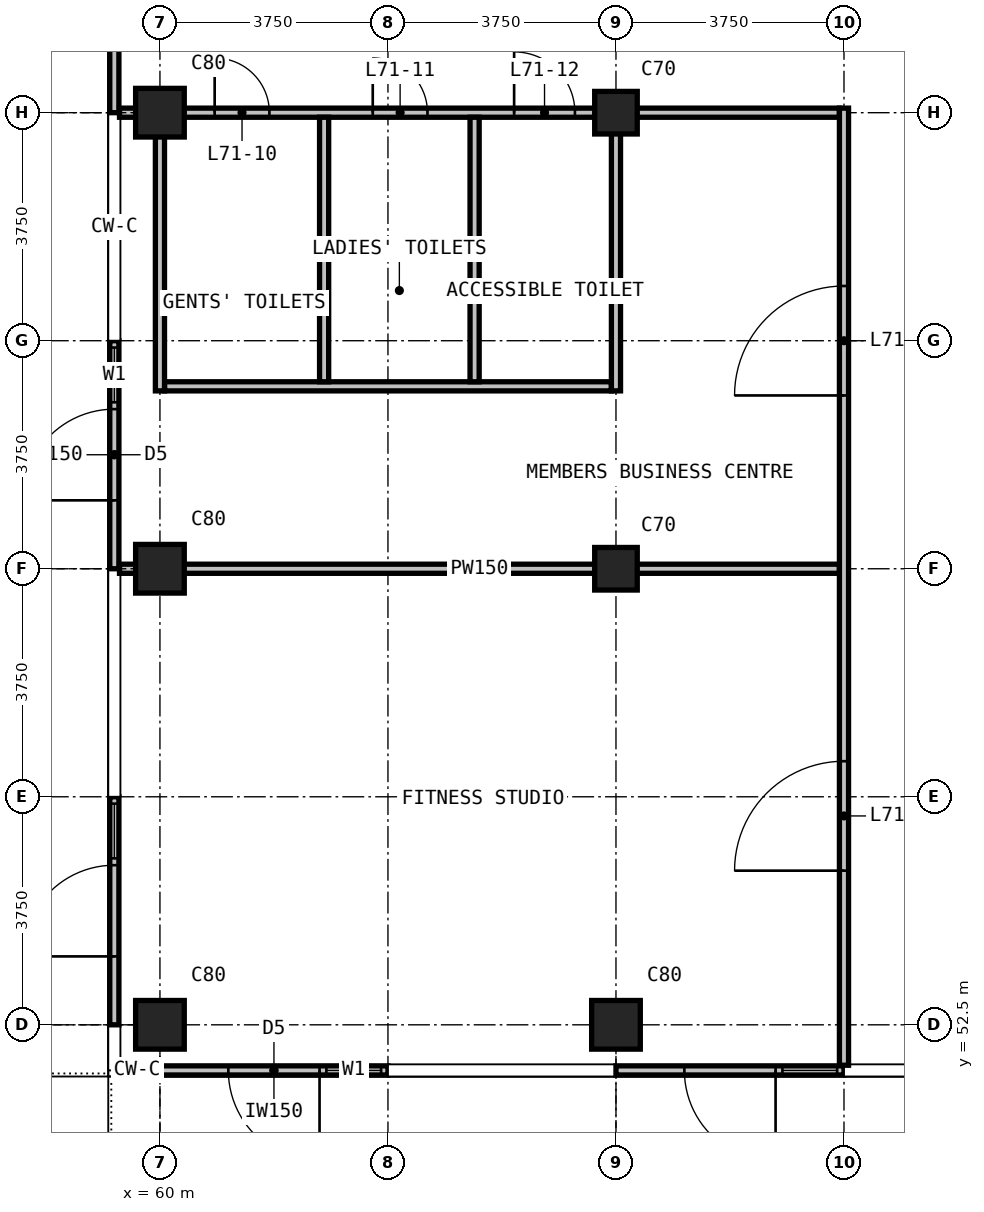
"""IFC4 building model, lengths in metres.
Left out: names, types, materials, properties, quantities, classifications, styles, units other than length and angle.
Written with IfcOpenShell. Run it as: python <this file> out.ifc"""

import sys

from ifc_helpers import new_model, si_unit, direction, frame, frame_2d, origin, origin_2d, place, context, subcontext, project, spatial, rectangle, extrude, element, fill, save


model = new_model("IFC4")
c1 = context("Model", 3, precision=1e-05, world=origin(), true_north=direction((0.0, 1.0)))
c2 = subcontext(c1, "Body", "Model", "MODEL_VIEW")
j1 = project(units=[si_unit("LENGTHUNIT", "METRE"), si_unit("PLANEANGLEUNIT", "RADIAN")], contexts=[c1])
p1 = place(None, origin())
s1 = spatial("IfcSite", under=j1, at=p1, CompositionType="ELEMENT")
p2 = place(p1, origin())
s2 = spatial("IfcBuilding", under=s1, at=p2, CompositionType="ELEMENT")
p3 = place(p2, frame((0.0, 0.0, 272.9)))
s3 = spatial("IfcBuildingStorey", under=s2, at=p3, CompositionType="ELEMENT", Elevation=272.9)
for number, where, z_axis, x_axis in (
    (1, (60.0, 52.5, 0.0), (0.0, 0.0, 1.0), (1.0, 0.0, 0.0)),
    (2, (60.0, 60.0, 0.0), (0.0, 0.0, 1.0), (1.0, 0.0, 0.0)),
    (3, (60.0, 67.5, 0.0), (0.0, 0.0, 1.0), (1.0, 0.0, 0.0)),
    (4, (67.5, 52.5, 0.0), (0.0, 0.0, 1.0), (1.0, 0.0, 0.0)),
):
    element("IfcColumn", number, at=place(p3, frame(where, z_axis=z_axis, x_axis=x_axis)), inside=s3, PredefinedType="COLUMN", context=c2, shape_type="SweptSolid", body=[
        extrude(rectangle(XDim=0.8, YDim=0.8, at=origin_2d()), origin(), (0.0, 0.0, 1.0), 3.6),
    ])
for number, where, z_axis, x_axis in (
    (5, (67.5, 60.0, 0.0), (0.0, 0.0, 1.0), (1.0, 0.0, 0.0)),
    (6, (67.5, 67.5, 0.0), (0.0, 0.0, 1.0), (1.0, 0.0, 0.0)),
):
    element("IfcColumn", number, at=place(p3, frame(where, z_axis=z_axis, x_axis=x_axis)), inside=s3, PredefinedType="COLUMN", context=c2, shape_type="SweptSolid", body=[
        extrude(rectangle(XDim=0.7, YDim=0.7, at=origin_2d()), origin(), (0.0, 0.0, 1.0), 3.6),
    ])
p4 = place(p3, frame((59.25, 52.5, 0.0), z_axis=(0.0, 0.0, 1.0), x_axis=(0.0, 1.0, 0.0)))
e7 = element("IfcWall", 7, at=p4, inside=s3, PredefinedType="SOLIDWALL", context=c2, shape_type="SweptSolid", body=[
    extrude(rectangle(XDim=3.75, YDim=0.15, at=frame_2d((1.875, 0.0))), origin(), (0.0, 0.0, 1.0), 3.3),
])
p5 = place(p4, frame((1.125, 0.0, 0.0)))
e8 = element("IfcOpeningElement", 8, at=p5, cuts=e7, PredefinedType="OPENING", context=c2, shape_type="SweptSolid", body=[
    extrude(rectangle(XDim=1.5, YDim=2.4, at=frame_2d((0.75, 1.2))), frame((0.0, 0.085, 0.0), z_axis=(0.0, -1.0, 0.0), x_axis=(1.0, 0.0, 0.0)), (0.0, 0.0, 1.0), 0.17),
])
p6 = place(p4, frame((2.738, 0.0, 0.1)))
e9 = element("IfcOpeningElement", 9, at=p6, cuts=e7, PredefinedType="OPENING", context=c2, shape_type="SweptSolid", body=[
    extrude(rectangle(XDim=0.9, YDim=2.4, at=frame_2d((0.45, 1.2))), frame((0.0, 0.085, 0.0), z_axis=(0.0, -1.0, 0.0), x_axis=(1.0, 0.0, 0.0)), (0.0, 0.0, 1.0), 0.17),
])
p7 = place(p3, frame((59.25, 60.0, 0.0), z_axis=(0.0, 0.0, 1.0), x_axis=(0.0, 1.0, 0.0)))
e10 = element("IfcWall", 10, at=p7, inside=s3, PredefinedType="SOLIDWALL", context=c2, shape_type="SweptSolid", body=[
    extrude(rectangle(XDim=3.75, YDim=0.15, at=frame_2d((1.875, 0.0))), origin(), (0.0, 0.0, 1.0), 3.3),
])
p8 = place(p7, frame((1.125, 0.0, 0.0)))
e11 = element("IfcOpeningElement", 11, at=p8, cuts=e10, PredefinedType="OPENING", context=c2, shape_type="SweptSolid", body=[
    extrude(rectangle(XDim=1.5, YDim=2.4, at=frame_2d((0.75, 1.2))), frame((0.0, 0.085, 0.0), z_axis=(0.0, -1.0, 0.0), x_axis=(1.0, 0.0, 0.0)), (0.0, 0.0, 1.0), 0.17),
])
p9 = place(p7, frame((2.738, 0.0, 0.1)))
e12 = element("IfcOpeningElement", 12, at=p9, cuts=e10, PredefinedType="OPENING", context=c2, shape_type="SweptSolid", body=[
    extrude(rectangle(XDim=0.9, YDim=2.4, at=frame_2d((0.45, 1.2))), frame((0.0, 0.085, 0.0), z_axis=(0.0, -1.0, 0.0), x_axis=(1.0, 0.0, 0.0)), (0.0, 0.0, 1.0), 0.17),
])
p10 = place(p3, frame((59.25, 67.5, 0.0), z_axis=(0.0, 0.0, 1.0), x_axis=(0.0, 1.0, 0.0)))
e13 = element("IfcWall", 13, at=p10, inside=s3, PredefinedType="SOLIDWALL", context=c2, shape_type="SweptSolid", body=[
    extrude(rectangle(XDim=3.75, YDim=0.15, at=frame_2d((1.875, 0.0))), origin(), (0.0, 0.0, 1.0), 3.3),
])
p11 = place(p10, frame((1.125, 0.0, 0.0)))
e14 = element("IfcOpeningElement", 14, at=p11, cuts=e13, PredefinedType="OPENING", context=c2, shape_type="SweptSolid", body=[
    extrude(rectangle(XDim=1.5, YDim=2.4, at=frame_2d((0.75, 1.2))), frame((0.0, 0.085, 0.0), z_axis=(0.0, -1.0, 0.0), x_axis=(1.0, 0.0, 0.0)), (0.0, 0.0, 1.0), 0.17),
])
p12 = place(p10, frame((2.738, 0.0, 0.1)))
e15 = element("IfcOpeningElement", 15, at=p12, cuts=e13, PredefinedType="OPENING", context=c2, shape_type="SweptSolid", body=[
    extrude(rectangle(XDim=0.9, YDim=2.4, at=frame_2d((0.45, 1.2))), frame((0.0, 0.085, 0.0), z_axis=(0.0, -1.0, 0.0), x_axis=(1.0, 0.0, 0.0)), (0.0, 0.0, 1.0), 0.17),
])
p13 = place(p3, frame((63.75, 51.75, 0.0), z_axis=(0.0, 0.0, 1.0), x_axis=(-1.0, 0.0, 0.0)))
e16 = element("IfcWall", 16, at=p13, inside=s3, PredefinedType="SOLIDWALL", context=c2, shape_type="SweptSolid", body=[
    extrude(rectangle(XDim=3.75, YDim=0.15, at=frame_2d((1.875, 0.0))), origin(), (0.0, 0.0, 1.0), 3.3),
])
p14 = place(p13, frame((0.113, 0.0, 0.1)))
e17 = element("IfcOpeningElement", 17, at=p14, cuts=e16, PredefinedType="OPENING", context=c2, shape_type="SweptSolid", body=[
    extrude(rectangle(XDim=0.9, YDim=2.4, at=frame_2d((0.45, 1.2))), frame((0.0, 0.085, 0.0), z_axis=(0.0, -1.0, 0.0), x_axis=(1.0, 0.0, 0.0)), (0.0, 0.0, 1.0), 0.17),
])
p15 = place(p13, frame((1.125, 0.0, 0.0)))
e18 = element("IfcOpeningElement", 18, at=p15, cuts=e16, PredefinedType="OPENING", context=c2, shape_type="SweptSolid", body=[
    extrude(rectangle(XDim=1.5, YDim=2.4, at=frame_2d((0.75, 1.2))), frame((0.0, 0.085, 0.0), z_axis=(0.0, -1.0, 0.0), x_axis=(1.0, 0.0, 0.0)), (0.0, 0.0, 1.0), 0.17),
])
p16 = place(p3, frame((71.25, 51.75, 0.0), z_axis=(0.0, 0.0, 1.0), x_axis=(-1.0, 0.0, 0.0)))
e19 = element("IfcWall", 19, at=p16, inside=s3, PredefinedType="SOLIDWALL", context=c2, shape_type="SweptSolid", body=[
    extrude(rectangle(XDim=3.75, YDim=0.15, at=frame_2d((1.875, 0.0))), origin(), (0.0, 0.0, 1.0), 3.3),
])
p17 = place(p16, frame((0.113, 0.0, 0.1)))
e20 = element("IfcOpeningElement", 20, at=p17, cuts=e19, PredefinedType="OPENING", context=c2, shape_type="SweptSolid", body=[
    extrude(rectangle(XDim=0.9, YDim=2.4, at=frame_2d((0.45, 1.2))), frame((0.0, 0.085, 0.0), z_axis=(0.0, -1.0, 0.0), x_axis=(1.0, 0.0, 0.0)), (0.0, 0.0, 1.0), 0.17),
])
p18 = place(p16, frame((1.125, 0.0, 0.0)))
e21 = element("IfcOpeningElement", 21, at=p18, cuts=e19, PredefinedType="OPENING", context=c2, shape_type="SweptSolid", body=[
    extrude(rectangle(XDim=1.5, YDim=2.4, at=frame_2d((0.75, 1.2))), frame((0.0, 0.085, 0.0), z_axis=(0.0, -1.0, 0.0), x_axis=(1.0, 0.0, 0.0)), (0.0, 0.0, 1.0), 0.17),
])
p19 = place(p3, frame((59.335, 60.0, 0.0), z_axis=(0.0, 0.0, 1.0), x_axis=(1.0, 0.0, 0.0)))
e22 = element("IfcWall", 22, at=p19, inside=s3, PredefinedType="PARTITIONING", context=c2, shape_type="SweptSolid", body=[
    extrude(rectangle(XDim=11.84, YDim=0.15, at=frame_2d((5.92, 0.0))), origin(), (0.0, 0.0, 1.0), 3.3),
])
p20 = place(p3, frame((60.075, 63.0, 0.0), z_axis=(0.0, 0.0, 1.0), x_axis=(1.0, 0.0, 0.0)))
e23 = element("IfcWall", 23, at=p20, inside=s3, PredefinedType="PARTITIONING", context=c2, shape_type="SweptSolid", body=[
    extrude(rectangle(XDim=7.35, YDim=0.15, at=frame_2d((3.675, 0.0))), origin(), (0.0, 0.0, 1.0), 3.3),
])
p21 = place(p3, frame((59.335, 67.5, 0.0), z_axis=(0.0, 0.0, 1.0), x_axis=(1.0, 0.0, 0.0)))
e24 = element("IfcWall", 24, at=p21, inside=s3, PredefinedType="PARTITIONING", context=c2, shape_type="SweptSolid", body=[
    extrude(rectangle(XDim=11.84, YDim=0.15, at=frame_2d((5.92, 0.0))), origin(), (0.0, 0.0, 1.0), 3.3),
])
p22 = place(p21, frame((1.565, 0.0, 0.0)))
e25 = element("IfcOpeningElement", 25, at=p22, cuts=e24, PredefinedType="OPENING", context=c2, shape_type="SweptSolid", body=[
    extrude(rectangle(XDim=0.9, YDim=2.2, at=frame_2d((0.45, 1.1))), frame((0.0, 0.085, 0.0), z_axis=(0.0, -1.0, 0.0), x_axis=(1.0, 0.0, 0.0)), (0.0, 0.0, 1.0), 0.17),
])
p23 = place(p21, frame((4.165, 0.0, 0.0)))
e26 = element("IfcOpeningElement", 26, at=p23, cuts=e24, PredefinedType="OPENING", context=c2, shape_type="SweptSolid", body=[
    extrude(rectangle(XDim=0.9, YDim=2.2, at=frame_2d((0.45, 1.1))), frame((0.0, 0.085, 0.0), z_axis=(0.0, -1.0, 0.0), x_axis=(1.0, 0.0, 0.0)), (0.0, 0.0, 1.0), 0.17),
])
p24 = place(p21, frame((6.49, 0.0, 0.0)))
e27 = element("IfcOpeningElement", 27, at=p24, cuts=e24, PredefinedType="OPENING", context=c2, shape_type="SweptSolid", body=[
    extrude(rectangle(XDim=1.0, YDim=2.2, at=frame_2d((0.5, 1.1))), frame((0.0, 0.085, 0.0), z_axis=(0.0, -1.0, 0.0), x_axis=(1.0, 0.0, 0.0)), (0.0, 0.0, 1.0), 0.17),
])
p25 = place(p3, frame((60.0, 62.925, 0.0), z_axis=(0.0, 0.0, 1.0), x_axis=(0.0, 1.0, 0.0)))
e28 = element("IfcWall", 28, at=p25, inside=s3, PredefinedType="PARTITIONING", context=c2, shape_type="SweptSolid", body=[
    extrude(rectangle(XDim=4.5, YDim=0.15, at=frame_2d((2.25, 0.0))), origin(), (0.0, 0.0, 1.0), 3.3),
])
for number, where, z_axis, x_axis in (
    (29, (62.7, 63.075, 0.0), (0.0, 0.0, 1.0), (0.0, 1.0, 0.0)),
    (30, (65.175, 63.075, 0.0), (0.0, 0.0, 1.0), (0.0, 1.0, 0.0)),
):
    element("IfcWall", number, at=place(p3, frame(where, z_axis=z_axis, x_axis=x_axis)), inside=s3, PredefinedType="PARTITIONING", context=c2, shape_type="SweptSolid", body=[
        extrude(rectangle(XDim=4.35, YDim=0.15, at=frame_2d((2.175, 0.0))), origin(), (0.0, 0.0, 1.0), 3.3),
    ])
p26 = place(p3, frame((67.5, 62.925, 0.0), z_axis=(0.0, 0.0, 1.0), x_axis=(0.0, 1.0, 0.0)))
e31 = element("IfcWall", 31, at=p26, inside=s3, PredefinedType="PARTITIONING", context=c2, shape_type="SweptSolid", body=[
    extrude(rectangle(XDim=4.5, YDim=0.15, at=frame_2d((2.25, 0.0))), origin(), (0.0, 0.0, 1.0), 3.3),
])
p27 = place(p3, frame((71.25, 51.835, 0.0), z_axis=(0.0, 0.0, 1.0), x_axis=(0.0, 1.0, 0.0)))
e32 = element("IfcWall", 32, at=p27, inside=s3, PredefinedType="PARTITIONING", context=c2, shape_type="SweptSolid", body=[
    extrude(rectangle(XDim=15.74, YDim=0.15, at=frame_2d((7.87, 0.0))), origin(), (0.0, 0.0, 1.0), 3.3),
])
p28 = place(p27, frame((11.015, 0.0, 0.0)))
e33 = element("IfcOpeningElement", 33, at=p28, cuts=e32, PredefinedType="OPENING", context=c2, shape_type="SweptSolid", body=[
    extrude(rectangle(XDim=1.8, YDim=2.2, at=frame_2d((0.9, 1.1))), frame((0.0, 0.085, 0.0), z_axis=(0.0, -1.0, 0.0), x_axis=(1.0, 0.0, 0.0)), (0.0, 0.0, 1.0), 0.17),
])
p29 = place(p27, frame((3.2, 0.0, 0.0)))
e34 = element("IfcOpeningElement", 34, at=p29, cuts=e32, PredefinedType="OPENING", context=c2, shape_type="SweptSolid", body=[
    extrude(rectangle(XDim=1.8, YDim=2.2, at=frame_2d((0.9, 1.1))), frame((0.0, 0.085, 0.0), z_axis=(0.0, -1.0, 0.0), x_axis=(1.0, 0.0, 0.0)), (0.0, 0.0, 1.0), 0.17),
])
p30 = place(p5, origin())
e35 = element("IfcDoor", 35, at=p30, inside=s3, OperationType="DOUBLE_DOOR_SINGLE_SWING", PredefinedType="DOOR", context=c2, shape_type="SweptSolid", body=[
    extrude(rectangle(XDim=1.5, YDim=2.4, at=frame_2d((0.75, 1.2))), frame((0.0, 0.025, 0.0), z_axis=(0.0, -1.0, 0.0), x_axis=(1.0, 0.0, 0.0)), (0.0, 0.0, 1.0), 0.05),
])
fill(e8, e35)
p31 = place(p6, origin())
e36 = element("IfcWindow", 36, at=p31, inside=s3, PartitioningType="SINGLE_PANEL", PredefinedType="WINDOW", context=c2, shape_type="SweptSolid", body=[
    extrude(rectangle(XDim=0.9, YDim=2.4, at=frame_2d((0.45, 1.2))), frame((0.0, 0.03, 0.0), z_axis=(0.0, -1.0, 0.0), x_axis=(1.0, 0.0, 0.0)), (0.0, 0.0, 1.0), 0.06),
])
fill(e9, e36)
p32 = place(p8, origin())
e37 = element("IfcDoor", 37, at=p32, inside=s3, OperationType="DOUBLE_DOOR_SINGLE_SWING", PredefinedType="DOOR", context=c2, shape_type="SweptSolid", body=[
    extrude(rectangle(XDim=1.5, YDim=2.4, at=frame_2d((0.75, 1.2))), frame((0.0, 0.025, 0.0), z_axis=(0.0, -1.0, 0.0), x_axis=(1.0, 0.0, 0.0)), (0.0, 0.0, 1.0), 0.05),
])
fill(e11, e37)
p33 = place(p9, origin())
e38 = element("IfcWindow", 38, at=p33, inside=s3, PartitioningType="SINGLE_PANEL", PredefinedType="WINDOW", context=c2, shape_type="SweptSolid", body=[
    extrude(rectangle(XDim=0.9, YDim=2.4, at=frame_2d((0.45, 1.2))), frame((0.0, 0.03, 0.0), z_axis=(0.0, -1.0, 0.0), x_axis=(1.0, 0.0, 0.0)), (0.0, 0.0, 1.0), 0.06),
])
fill(e12, e38)
p34 = place(p14, origin())
e39 = element("IfcWindow", 39, at=p34, inside=s3, PartitioningType="SINGLE_PANEL", PredefinedType="WINDOW", context=c2, shape_type="SweptSolid", body=[
    extrude(rectangle(XDim=0.9, YDim=2.4, at=frame_2d((0.45, 1.2))), frame((0.0, 0.03, 0.0), z_axis=(0.0, -1.0, 0.0), x_axis=(1.0, 0.0, 0.0)), (0.0, 0.0, 1.0), 0.06),
])
fill(e17, e39)
p35 = place(p15, origin())
e40 = element("IfcDoor", 40, at=p35, inside=s3, OperationType="DOUBLE_DOOR_SINGLE_SWING", PredefinedType="DOOR", context=c2, shape_type="SweptSolid", body=[
    extrude(rectangle(XDim=1.5, YDim=2.4, at=frame_2d((0.75, 1.2))), frame((0.0, 0.025, 0.0), z_axis=(0.0, -1.0, 0.0), x_axis=(1.0, 0.0, 0.0)), (0.0, 0.0, 1.0), 0.05),
])
fill(e18, e40)
p36 = place(p17, origin())
e41 = element("IfcWindow", 41, at=p36, inside=s3, PartitioningType="SINGLE_PANEL", PredefinedType="WINDOW", context=c2, shape_type="SweptSolid", body=[
    extrude(rectangle(XDim=0.9, YDim=2.4, at=frame_2d((0.45, 1.2))), frame((0.0, 0.03, 0.0), z_axis=(0.0, -1.0, 0.0), x_axis=(1.0, 0.0, 0.0)), (0.0, 0.0, 1.0), 0.06),
])
fill(e20, e41)
p37 = place(p18, origin())
e42 = element("IfcDoor", 42, at=p37, inside=s3, OperationType="DOUBLE_DOOR_SINGLE_SWING", PredefinedType="DOOR", context=c2, shape_type="SweptSolid", body=[
    extrude(rectangle(XDim=1.5, YDim=2.4, at=frame_2d((0.75, 1.2))), frame((0.0, 0.025, 0.0), z_axis=(0.0, -1.0, 0.0), x_axis=(1.0, 0.0, 0.0)), (0.0, 0.0, 1.0), 0.05),
])
fill(e21, e42)
p38 = place(p22, origin())
e43 = element("IfcDoor", 43, at=p38, inside=s3, OperationType="SINGLE_SWING_LEFT", PredefinedType="DOOR", context=c2, shape_type="SweptSolid", body=[
    extrude(rectangle(XDim=0.9, YDim=2.2, at=frame_2d((0.45, 1.1))), frame((0.0, 0.025, 0.0), z_axis=(0.0, -1.0, 0.0), x_axis=(1.0, 0.0, 0.0)), (0.0, 0.0, 1.0), 0.05),
])
fill(e25, e43)
p39 = place(p23, origin())
e44 = element("IfcDoor", 44, at=p39, inside=s3, OperationType="SINGLE_SWING_LEFT", PredefinedType="DOOR", context=c2, shape_type="SweptSolid", body=[
    extrude(rectangle(XDim=0.9, YDim=2.2, at=frame_2d((0.45, 1.1))), frame((0.0, 0.025, 0.0), z_axis=(0.0, -1.0, 0.0), x_axis=(1.0, 0.0, 0.0)), (0.0, 0.0, 1.0), 0.05),
])
fill(e26, e44)
p40 = place(p24, origin())
e45 = element("IfcDoor", 45, at=p40, inside=s3, OperationType="SINGLE_SWING_RIGHT", PredefinedType="DOOR", context=c2, shape_type="SweptSolid", body=[
    extrude(rectangle(XDim=1.0, YDim=2.2, at=frame_2d((0.5, 1.1))), frame((0.0, 0.025, 0.0), z_axis=(0.0, -1.0, 0.0), x_axis=(1.0, 0.0, 0.0)), (0.0, 0.0, 1.0), 0.05),
])
fill(e27, e45)
p41 = place(p28, origin())
e46 = element("IfcDoor", 46, at=p41, inside=s3, OperationType="DOUBLE_DOOR_SINGLE_SWING", PredefinedType="DOOR", context=c2, shape_type="SweptSolid", body=[
    extrude(rectangle(XDim=1.8, YDim=2.2, at=frame_2d((0.9, 1.1))), frame((0.0, 0.025, 0.0), z_axis=(0.0, -1.0, 0.0), x_axis=(1.0, 0.0, 0.0)), (0.0, 0.0, 1.0), 0.05),
])
fill(e33, e46)
p42 = place(p29, origin())
e47 = element("IfcDoor", 47, at=p42, inside=s3, OperationType="DOUBLE_DOOR_SINGLE_SWING", PredefinedType="DOOR", context=c2, shape_type="SweptSolid", body=[
    extrude(rectangle(XDim=1.8, YDim=2.2, at=frame_2d((0.9, 1.1))), frame((0.0, 0.025, 0.0), z_axis=(0.0, -1.0, 0.0), x_axis=(1.0, 0.0, 0.0)), (0.0, 0.0, 1.0), 0.05),
])
fill(e34, e47)
save(model, sys.argv[1])
